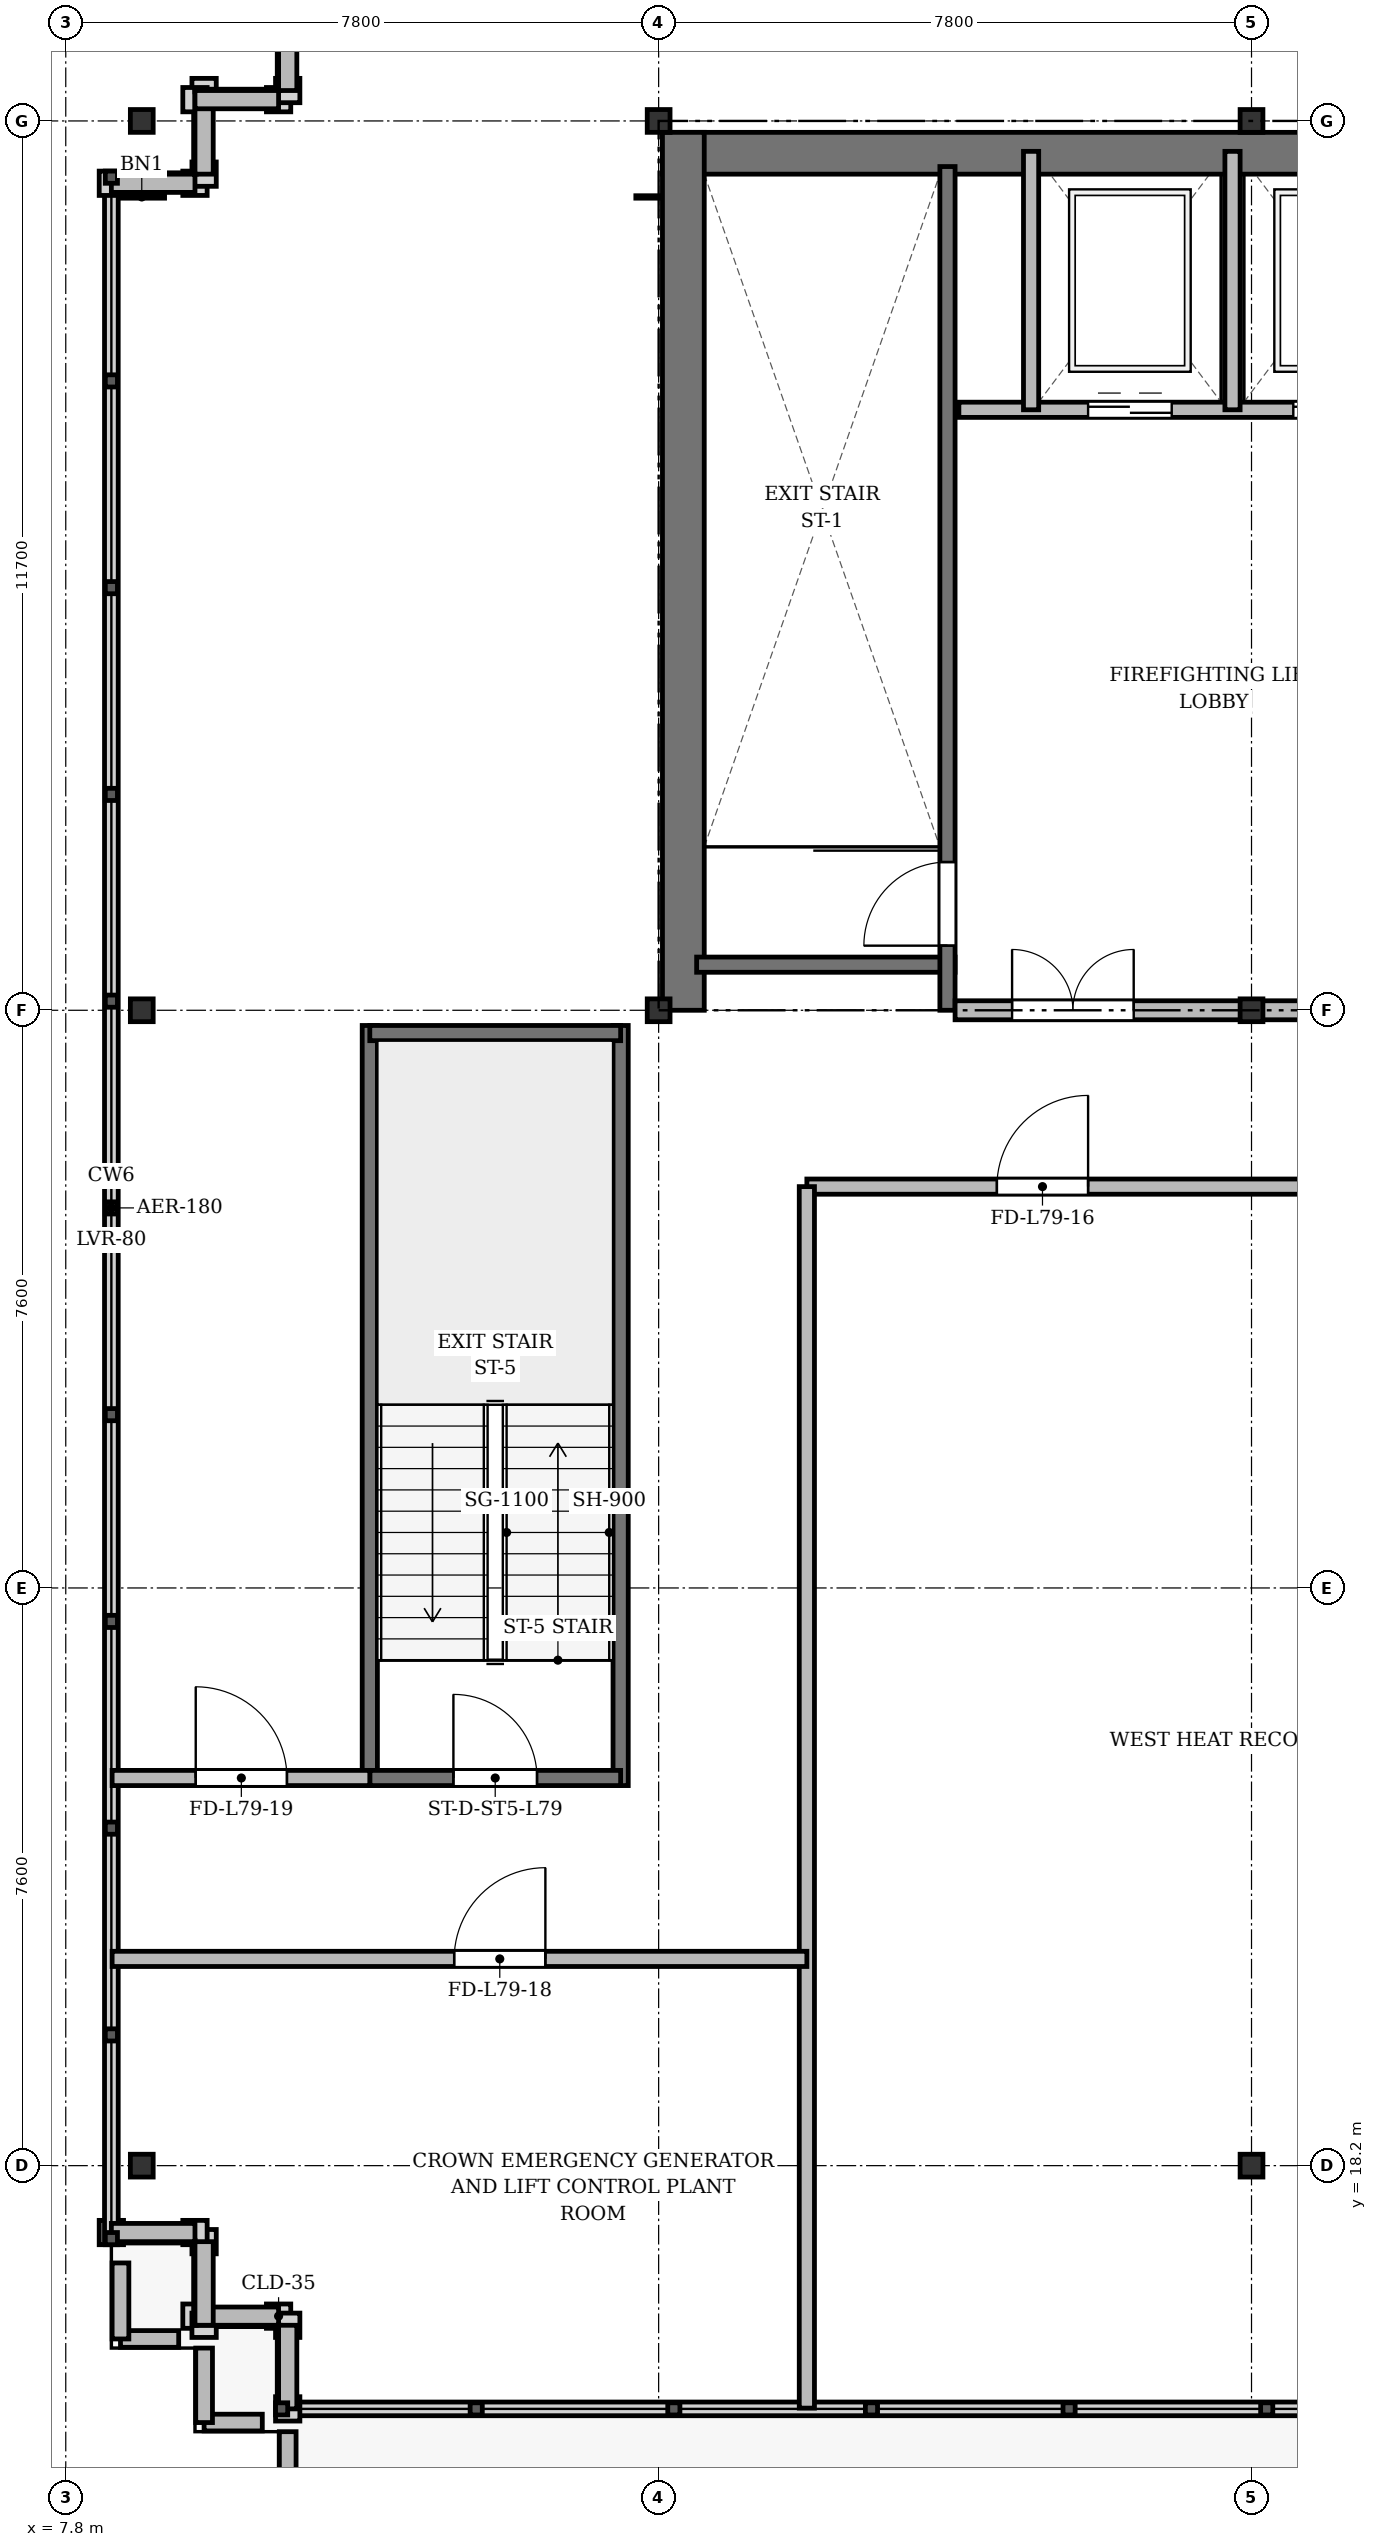
"""IFC4 building model, lengths in metres.
Left out: names, types, materials, properties, quantities, classifications, styles, units other than length and angle.
Written with IfcOpenShell. Run it as: python <this file> out.ifc"""

import sys

from ifc_helpers import new_model, si_unit, direction, frame, frame_2d, origin, origin_2d, place, context, subcontext, project, spatial, rectangle, i_section, extrude, source, transform, mapped, element, fill, save


model = new_model("IFC4")
c1 = context("Model", 3, precision=1e-05, world=origin(), true_north=direction((0.0, 1.0)))
c2 = subcontext(c1, "Body", "Model", "MODEL_VIEW")
j1 = project(units=[si_unit("LENGTHUNIT", "METRE"), si_unit("PLANEANGLEUNIT", "RADIAN")], contexts=[c1])
p1 = place(None, origin())
s1 = spatial("IfcSite", under=j1, at=p1, CompositionType="ELEMENT")
p2 = place(p1, origin())
s2 = spatial("IfcBuilding", under=s1, at=p2, CompositionType="ELEMENT")
p3 = place(p2, frame((0.0, 0.0, 303.5)))
s3 = spatial("IfcBuildingStorey", under=s2, at=p3, CompositionType="ELEMENT", Elevation=303.5)
m1 = source(origin(), c2, "Body", "SweptSolid", [
    extrude(i_section(OverallWidth=0.3, OverallDepth=0.3, WebThickness=0.015, FlangeThickness=0.024, at=origin_2d()), origin(), (0.0, 0.0, 1.0), 4.4),
])
for number, where, z_axis, x_axis in (
    (1, (8.8, 18.2, 0.0), (0.0, 0.0, 1.0), (1.0, 0.0, 0.0)),
    (2, (8.8, 33.4, 0.0), (0.0, 0.0, 1.0), (1.0, 0.0, 0.0)),
    (3, (8.8, 45.1, 0.0), (0.0, 0.0, 1.0), (1.0, 0.0, 0.0)),
    (4, (15.6, 18.2, 0.0), (0.0, 0.0, 1.0), (1.0, 0.0, 0.0)),
    (5, (15.6, 33.4, 0.0), (0.0, 0.0, 1.0), (1.0, 0.0, 0.0)),
    (6, (15.6, 45.1, 0.0), (0.0, 0.0, 1.0), (1.0, 0.0, 0.0)),
    (7, (23.4, 18.2, 0.0), (0.0, 0.0, 1.0), (1.0, 0.0, 0.0)),
    (8, (23.4, 33.4, 0.0), (0.0, 0.0, 1.0), (1.0, 0.0, 0.0)),
    (9, (23.4, 45.1, 0.0), (0.0, 0.0, 1.0), (1.0, 0.0, 0.0)),
):
    element("IfcColumn", number, at=place(p3, frame(where, z_axis=z_axis, x_axis=x_axis)), inside=s3, PredefinedType="COLUMN", context=c2, shape_type="MappedRepresentation", body=[
        mapped(m1, transform((0.0, 0.0, 0.0), x_axis=(1.0, 0.0, 0.0), y_axis=(0.0, 1.0, 0.0), z_axis=(0.0, 0.0, 1.0), scale=1.0)),
    ])
p4 = place(p3, frame((10.6, 16.22, 0.0), z_axis=(0.0, 0.0, 1.0), x_axis=(-1.0, 0.0, 0.0)))
e10 = element("IfcWall", 10, at=p4, inside=s3, PredefinedType="SOLIDWALL", context=c2, shape_type="SweptSolid", body=[
    extrude(rectangle(XDim=1.1, YDim=0.24, at=frame_2d((0.55, 0.0))), origin(), (0.0, 0.0, 1.0), 4.1),
])
p5 = place(p3, frame((9.62, 16.1, 0.0), z_axis=(0.0, 0.0, 1.0), x_axis=(0.0, 1.0, 0.0)))
e11 = element("IfcWall", 11, at=p5, inside=s3, PredefinedType="SOLIDWALL", context=c2, shape_type="SweptSolid", body=[
    extrude(rectangle(XDim=1.1, YDim=0.24, at=frame_2d((0.55, 0.0))), origin(), (0.0, 0.0, 1.0), 4.1),
])
p6 = place(p3, frame((9.5, 17.32, 0.0), z_axis=(0.0, 0.0, 1.0), x_axis=(-1.0, 0.0, 0.0)))
e12 = element("IfcWall", 12, at=p6, inside=s3, PredefinedType="SOLIDWALL", context=c2, shape_type="SweptSolid", body=[
    extrude(rectangle(XDim=1.1, YDim=0.24, at=frame_2d((0.55, 0.0))), origin(), (0.0, 0.0, 1.0), 4.1),
])
for number, where, z_axis, x_axis in (
    (13, (8.4, 44.28, 0.0), (0.0, 0.0, 1.0), (1.0, 0.0, 0.0)),
    (14, (9.62, 44.4, 0.0), (0.0, 0.0, 1.0), (0.0, 1.0, 0.0)),
):
    element("IfcWall", number, at=place(p3, frame(where, z_axis=z_axis, x_axis=x_axis)), inside=s3, PredefinedType="SOLIDWALL", context=c2, shape_type="SweptSolid", body=[
        extrude(rectangle(XDim=1.1, YDim=0.24, at=frame_2d((0.55, 0.0))), origin(), (0.0, 0.0, 1.0), 3.6),
    ])
for number, where, z_axis, x_axis in (
    (15, (9.5, 45.38, 0.0), (0.0, 0.0, 1.0), (1.0, 0.0, 0.0)),
    (16, (10.72, 45.5, 0.0), (0.0, 0.0, 1.0), (0.0, 1.0, 0.0)),
    (17, (10.72, 15.0, 0.0), (0.0, 0.0, 1.0), (0.0, 1.0, 0.0)),
):
    element("IfcWall", number, at=place(p3, frame(where, z_axis=z_axis, x_axis=x_axis)), inside=s3, PredefinedType="SOLIDWALL", context=c2, shape_type="SweptSolid", body=[
        extrude(rectangle(XDim=1.1, YDim=0.24, at=frame_2d((0.55, 0.0))), origin(), (0.0, 0.0, 1.0), 4.1),
    ])
p7 = place(p3, frame((10.72, 13.72, 0.0), z_axis=(0.0, 0.0, 1.0), x_axis=(0.0, 1.0, 0.0)))
e18 = element("IfcWall", 18, at=p7, inside=s3, PredefinedType="PARAPET", context=c2, shape_type="SweptSolid", body=[
    extrude(rectangle(XDim=0.98, YDim=0.22, at=frame_2d((0.49, 0.0))), origin(), (0.0, 0.0, 1.0), 1.08),
])
p8 = place(p3, frame((10.386, 14.82, 0.0), z_axis=(0.0, 0.0, 1.0), x_axis=(-1.0, 0.0, 0.0)))
e19 = element("IfcWall", 19, at=p8, inside=s3, PredefinedType="PARAPET", context=c2, shape_type="SweptSolid", body=[
    extrude(rectangle(XDim=0.766, YDim=0.22, at=frame_2d((0.383, 0.0))), origin(), (0.0, 0.0, 1.0), 1.08),
])
p9 = place(p3, frame((9.62, 14.82, 0.0), z_axis=(0.0, 0.0, 1.0), x_axis=(0.0, 1.0, 0.0)))
e20 = element("IfcWall", 20, at=p9, inside=s3, PredefinedType="PARAPET", context=c2, shape_type="SweptSolid", body=[
    extrude(rectangle(XDim=0.98, YDim=0.22, at=frame_2d((0.49, 0.0))), origin(), (0.0, 0.0, 1.0), 1.08),
])
p10 = place(p3, frame((9.286, 15.92, 0.0), z_axis=(0.0, 0.0, 1.0), x_axis=(-1.0, 0.0, 0.0)))
e21 = element("IfcWall", 21, at=p10, inside=s3, PredefinedType="PARAPET", context=c2, shape_type="SweptSolid", body=[
    extrude(rectangle(XDim=0.766, YDim=0.22, at=frame_2d((0.383, 0.0))), origin(), (0.0, 0.0, 1.0), 1.08),
])
p11 = place(p3, frame((8.52, 15.92, 0.0), z_axis=(0.0, 0.0, 1.0), x_axis=(0.0, 1.0, 0.0)))
e22 = element("IfcWall", 22, at=p11, inside=s3, PredefinedType="PARAPET", context=c2, shape_type="SweptSolid", body=[
    extrude(rectangle(XDim=1.0, YDim=0.22, at=frame_2d((0.5, 0.0))), origin(), (0.0, 0.0, 1.0), 1.08),
])
p12 = place(p3, frame((15.65, 44.675, 0.0), z_axis=(0.0, 0.0, 1.0), x_axis=(1.0, 0.0, 0.0)))
e23 = element("IfcWall", 23, at=p12, inside=s3, PredefinedType="SHEAR", context=c2, shape_type="SweptSolid", body=[
    extrude(rectangle(XDim=43.1, YDim=0.55, at=frame_2d((21.55, 0.0))), origin(), (0.0, 0.0, 1.0), 4.1),
])
p13 = place(p3, frame((15.925, 33.4, 0.0), z_axis=(0.0, 0.0, 1.0), x_axis=(0.0, 1.0, 0.0)))
e24 = element("IfcWall", 24, at=p13, inside=s3, PredefinedType="SHEAR", context=c2, shape_type="SweptSolid", body=[
    extrude(rectangle(XDim=11.55, YDim=0.55, at=frame_2d((5.775, 0.0))), origin(), (0.0, 0.0, 1.0), 4.1),
])
p14 = place(p3, frame((16.1, 34.0, 0.0), z_axis=(0.0, 0.0, 1.0), x_axis=(1.0, 0.0, 0.0)))
e25 = element("IfcWall", 25, at=p14, inside=s3, PredefinedType="SHEAR", context=c2, shape_type="SweptSolid", body=[
    extrude(rectangle(XDim=3.4, YDim=0.2, at=frame_2d((1.7, 0.0))), origin(), (0.0, 0.0, 1.0), 4.1),
])
p15 = place(p3, frame((19.4, 33.4, 0.0), z_axis=(0.0, 0.0, 1.0), x_axis=(0.0, 1.0, 0.0)))
e26 = element("IfcWall", 26, at=p15, inside=s3, PredefinedType="SHEAR", context=c2, shape_type="SweptSolid", body=[
    extrude(rectangle(XDim=11.1, YDim=0.2, at=frame_2d((5.55, 0.0))), origin(), (0.0, 0.0, 1.0), 4.1),
])
p16 = place(p15, frame((0.85, 0.0, 0.0)))
e27 = element("IfcOpeningElement", 27, at=p16, cuts=e26, PredefinedType="OPENING", context=c2, shape_type="SweptSolid", body=[
    extrude(rectangle(XDim=1.1, YDim=2.15, at=frame_2d((0.55, 1.075))), frame((0.0, 0.11, 0.0), z_axis=(0.0, -1.0, 0.0), x_axis=(1.0, 0.0, 0.0)), (0.0, 0.0, 1.0), 0.22),
])
for number, where, z_axis, x_axis in (
    (28, (11.8, 23.2, 0.0), (0.0, 0.0, 1.0), (0.0, 1.0, 0.0)),
    (29, (15.1, 23.2, 0.0), (0.0, 0.0, 1.0), (0.0, 1.0, 0.0)),
):
    element("IfcWall", number, at=place(p3, frame(where, z_axis=z_axis, x_axis=x_axis)), inside=s3, PredefinedType="SHEAR", context=c2, shape_type="SweptSolid", body=[
        extrude(rectangle(XDim=10.0, YDim=0.2, at=frame_2d((5.0, 0.0))), origin(), (0.0, 0.0, 1.0), 4.1),
    ])
p17 = place(p3, frame((11.8, 33.1, 0.0), z_axis=(0.0, 0.0, 1.0), x_axis=(1.0, 0.0, 0.0)))
e30 = element("IfcWall", 30, at=p17, inside=s3, PredefinedType="SHEAR", context=c2, shape_type="SweptSolid", body=[
    extrude(rectangle(XDim=3.3, YDim=0.2, at=frame_2d((1.65, 0.0))), origin(), (0.0, 0.0, 1.0), 4.1),
])
p18 = place(p3, frame((11.8, 23.3, 0.0), z_axis=(0.0, 0.0, 1.0), x_axis=(1.0, 0.0, 0.0)))
e31 = element("IfcWall", 31, at=p18, inside=s3, PredefinedType="SHEAR", context=c2, shape_type="SweptSolid", body=[
    extrude(rectangle(XDim=3.3, YDim=0.2, at=frame_2d((1.65, 0.0))), origin(), (0.0, 0.0, 1.0), 4.1),
])
p19 = place(p18, frame((1.1, 0.0, 0.0)))
e32 = element("IfcOpeningElement", 32, at=p19, cuts=e31, PredefinedType="OPENING", context=c2, shape_type="SweptSolid", body=[
    extrude(rectangle(XDim=1.1, YDim=2.15, at=frame_2d((0.55, 1.075))), frame((0.0, 0.11, 0.0), z_axis=(0.0, -1.0, 0.0), x_axis=(1.0, 0.0, 0.0)), (0.0, 0.0, 1.0), 0.22),
])
p20 = place(p3, frame((19.55, 41.3, 0.0), z_axis=(0.0, 0.0, 1.0), x_axis=(1.0, 0.0, 0.0)))
e33 = element("IfcWall", 33, at=p20, inside=s3, PredefinedType="SOLIDWALL", context=c2, shape_type="SweptSolid", body=[
    extrude(rectangle(XDim=6.75, YDim=0.2, at=frame_2d((3.375, 0.0))), origin(), (0.0, 0.0, 1.0), 4.1),
])
p21 = place(p20, frame((1.7, 0.0, 0.0)))
e34 = element("IfcOpeningElement", 34, at=p21, cuts=e33, PredefinedType="OPENING", context=c2, shape_type="SweptSolid", body=[
    extrude(rectangle(XDim=1.1, YDim=2.15, at=frame_2d((0.55, 1.075))), frame((0.0, 0.11, 0.0), z_axis=(0.0, -1.0, 0.0), x_axis=(1.0, 0.0, 0.0)), (0.0, 0.0, 1.0), 0.22),
])
p22 = place(p20, frame((4.4, 0.0, 0.0)))
e35 = element("IfcOpeningElement", 35, at=p22, cuts=e33, PredefinedType="OPENING", context=c2, shape_type="SweptSolid", body=[
    extrude(rectangle(XDim=1.1, YDim=2.15, at=frame_2d((0.55, 1.075))), frame((0.0, 0.11, 0.0), z_axis=(0.0, -1.0, 0.0), x_axis=(1.0, 0.0, 0.0)), (0.0, 0.0, 1.0), 0.22),
])
for number, where, z_axis, x_axis in (
    (36, (20.5, 41.3, 0.0), (0.0, 0.0, 1.0), (0.0, 1.0, 0.0)),
    (37, (23.15, 41.3, 0.0), (0.0, 0.0, 1.0), (0.0, 1.0, 0.0)),
):
    element("IfcWall", number, at=place(p3, frame(where, z_axis=z_axis, x_axis=x_axis)), inside=s3, PredefinedType="SOLIDWALL", context=c2, shape_type="SweptSolid", body=[
        extrude(rectangle(XDim=3.4, YDim=0.2, at=frame_2d((1.7, 0.0))), origin(), (0.0, 0.0, 1.0), 4.1),
    ])
p23 = place(p3, frame((19.5, 33.4, 0.0), z_axis=(0.0, 0.0, 1.0), x_axis=(1.0, 0.0, 0.0)))
e38 = element("IfcWall", 38, at=p23, inside=s3, PredefinedType="PARTITIONING", context=c2, shape_type="SweptSolid", body=[
    extrude(rectangle(XDim=6.8, YDim=0.25, at=frame_2d((3.4, 0.0))), origin(), (0.0, 0.0, 1.0), 3.6),
])
p24 = place(p23, frame((0.75, 0.0, 0.0)))
e39 = element("IfcOpeningElement", 39, at=p24, cuts=e38, PredefinedType="OPENING", context=c2, shape_type="SweptSolid", body=[
    extrude(rectangle(XDim=1.6, YDim=2.2, at=frame_2d((0.8, 1.1))), frame((0.0, 0.135, 0.0), z_axis=(0.0, -1.0, 0.0), x_axis=(1.0, 0.0, 0.0)), (0.0, 0.0, 1.0), 0.27),
])
p25 = place(p3, frame((17.55, 31.08, 0.0), z_axis=(0.0, 0.0, 1.0), x_axis=(1.0, 0.0, 0.0)))
e40 = element("IfcWall", 40, at=p25, inside=s3, PredefinedType="PARTITIONING", context=c2, shape_type="SweptSolid", body=[
    extrude(rectangle(XDim=14.47, YDim=0.2, at=frame_2d((7.235, 0.0))), origin(), (0.0, 0.0, 1.0), 3.6),
])
p26 = place(p25, frame((2.5, 0.0, 0.0)))
e41 = element("IfcOpeningElement", 41, at=p26, cuts=e40, PredefinedType="OPENING", context=c2, shape_type="SweptSolid", body=[
    extrude(rectangle(XDim=1.2, YDim=2.15, at=frame_2d((0.6, 1.075))), frame((0.0, 0.11, 0.0), z_axis=(0.0, -1.0, 0.0), x_axis=(1.0, 0.0, 0.0)), (0.0, 0.0, 1.0), 0.22),
])
p27 = place(p3, frame((17.55, 15.01, 0.0), z_axis=(0.0, 0.0, 1.0), x_axis=(0.0, 1.0, 0.0)))
e42 = element("IfcWall", 42, at=p27, inside=s3, PredefinedType="PARTITIONING", context=c2, shape_type="SweptSolid", body=[
    extrude(rectangle(XDim=16.07, YDim=0.2, at=frame_2d((8.035, 0.0))), origin(), (0.0, 0.0, 1.0), 3.6),
])
p28 = place(p3, frame((8.41, 20.92, 0.0), z_axis=(0.0, 0.0, 1.0), x_axis=(1.0, 0.0, 0.0)))
e43 = element("IfcWall", 43, at=p28, inside=s3, PredefinedType="PARTITIONING", context=c2, shape_type="SweptSolid", body=[
    extrude(rectangle(XDim=9.14, YDim=0.2, at=frame_2d((4.57, 0.0))), origin(), (0.0, 0.0, 1.0), 3.6),
])
p29 = place(p28, frame((4.5, 0.0, 0.0)))
e44 = element("IfcOpeningElement", 44, at=p29, cuts=e43, PredefinedType="OPENING", context=c2, shape_type="SweptSolid", body=[
    extrude(rectangle(XDim=1.2, YDim=2.15, at=frame_2d((0.6, 1.075))), frame((0.0, 0.11, 0.0), z_axis=(0.0, -1.0, 0.0), x_axis=(1.0, 0.0, 0.0)), (0.0, 0.0, 1.0), 0.22),
])
p30 = place(p3, frame((8.41, 23.3, 0.0), z_axis=(0.0, 0.0, 1.0), x_axis=(1.0, 0.0, 0.0)))
e45 = element("IfcWall", 45, at=p30, inside=s3, PredefinedType="PARTITIONING", context=c2, shape_type="SweptSolid", body=[
    extrude(rectangle(XDim=3.39, YDim=0.2, at=frame_2d((1.695, 0.0))), origin(), (0.0, 0.0, 1.0), 3.6),
])
p31 = place(p30, frame((1.1, 0.0, 0.0)))
e46 = element("IfcOpeningElement", 46, at=p31, cuts=e45, PredefinedType="OPENING", context=c2, shape_type="SweptSolid", body=[
    extrude(rectangle(XDim=1.2, YDim=2.15, at=frame_2d((0.6, 1.075))), frame((0.0, 0.11, 0.0), z_axis=(0.0, -1.0, 0.0), x_axis=(1.0, 0.0, 0.0)), (0.0, 0.0, 1.0), 0.22),
])
m2 = source(origin(), c2, "Body", "SweptSolid", [
    extrude(rectangle(XDim=1.1, YDim=2.15, at=frame_2d((0.55, 1.075))), frame((0.0, 0.025, 0.0), z_axis=(0.0, -1.0, 0.0), x_axis=(1.0, 0.0, 0.0)), (0.0, 0.0, 1.0), 0.05),
])
p32 = place(p16, origin())
e47 = element("IfcDoor", 47, at=p32, inside=s3, OperationType="SINGLE_SWING_LEFT", PredefinedType="DOOR", context=c2, shape_type="MappedRepresentation", body=[
    mapped(m2, transform((0.0, 0.0, 0.0), x_axis=(1.0, 0.0, 0.0), y_axis=(0.0, 1.0, 0.0), z_axis=(0.0, 0.0, 1.0), scale=1.0)),
])
fill(e27, e47)
p33 = place(p19, origin())
e48 = element("IfcDoor", 48, at=p33, inside=s3, OperationType="SINGLE_SWING_LEFT", PredefinedType="DOOR", context=c2, shape_type="MappedRepresentation", body=[
    mapped(m2, transform((0.0, 0.0, 0.0), x_axis=(1.0, 0.0, 0.0), y_axis=(0.0, 1.0, 0.0), z_axis=(0.0, 0.0, 1.0), scale=1.0)),
])
fill(e32, e48)
p34 = place(p21, origin())
e49 = element("IfcDoor", 49, at=p34, inside=s3, OperationType="DOUBLE_DOOR_SLIDING", PredefinedType="DOOR", context=c2, shape_type="MappedRepresentation", body=[
    mapped(m2, transform((0.0, 0.0, 0.0), x_axis=(1.0, 0.0, 0.0), y_axis=(0.0, 1.0, 0.0), z_axis=(0.0, 0.0, 1.0), scale=1.0)),
])
fill(e34, e49)
p35 = place(p22, origin())
e50 = element("IfcDoor", 50, at=p35, inside=s3, OperationType="DOUBLE_DOOR_SLIDING", PredefinedType="DOOR", context=c2, shape_type="MappedRepresentation", body=[
    mapped(m2, transform((0.0, 0.0, 0.0), x_axis=(1.0, 0.0, 0.0), y_axis=(0.0, 1.0, 0.0), z_axis=(0.0, 0.0, 1.0), scale=1.0)),
])
fill(e35, e50)
m3 = source(origin(), c2, "Body", "SweptSolid", [
    extrude(rectangle(XDim=1.6, YDim=2.2, at=frame_2d((0.8, 1.1))), frame((0.0, 0.025, 0.0), z_axis=(0.0, -1.0, 0.0), x_axis=(1.0, 0.0, 0.0)), (0.0, 0.0, 1.0), 0.05),
])
p36 = place(p24, origin())
e51 = element("IfcDoor", 51, at=p36, inside=s3, OperationType="DOUBLE_DOOR_SINGLE_SWING", PredefinedType="DOOR", context=c2, shape_type="MappedRepresentation", body=[
    mapped(m3, transform((0.0, 0.0, 0.0), x_axis=(1.0, 0.0, 0.0), y_axis=(0.0, 1.0, 0.0), z_axis=(0.0, 0.0, 1.0), scale=1.0)),
])
fill(e39, e51)
m4 = source(origin(), c2, "Body", "SweptSolid", [
    extrude(rectangle(XDim=1.2, YDim=2.15, at=frame_2d((0.6, 1.075))), frame((0.0, 0.025, 0.0), z_axis=(0.0, -1.0, 0.0), x_axis=(1.0, 0.0, 0.0)), (0.0, 0.0, 1.0), 0.05),
])
p37 = place(p26, origin())
e52 = element("IfcDoor", 52, at=p37, inside=s3, OperationType="SINGLE_SWING_RIGHT", PredefinedType="DOOR", context=c2, shape_type="MappedRepresentation", body=[
    mapped(m4, transform((0.0, 0.0, 0.0), x_axis=(1.0, 0.0, 0.0), y_axis=(0.0, 1.0, 0.0), z_axis=(0.0, 0.0, 1.0), scale=1.0)),
])
fill(e41, e52)
p38 = place(p29, origin())
e53 = element("IfcDoor", 53, at=p38, inside=s3, OperationType="SINGLE_SWING_RIGHT", PredefinedType="DOOR", context=c2, shape_type="MappedRepresentation", body=[
    mapped(m4, transform((0.0, 0.0, 0.0), x_axis=(1.0, 0.0, 0.0), y_axis=(0.0, 1.0, 0.0), z_axis=(0.0, 0.0, 1.0), scale=1.0)),
])
fill(e44, e53)
p39 = place(p31, origin())
e54 = element("IfcDoor", 54, at=p39, inside=s3, OperationType="SINGLE_SWING_LEFT", PredefinedType="DOOR", context=c2, shape_type="MappedRepresentation", body=[
    mapped(m4, transform((0.0, 0.0, 0.0), x_axis=(1.0, 0.0, 0.0), y_axis=(0.0, 1.0, 0.0), z_axis=(0.0, 0.0, 1.0), scale=1.0)),
])
fill(e46, e54)
save(model, sys.argv[1])
